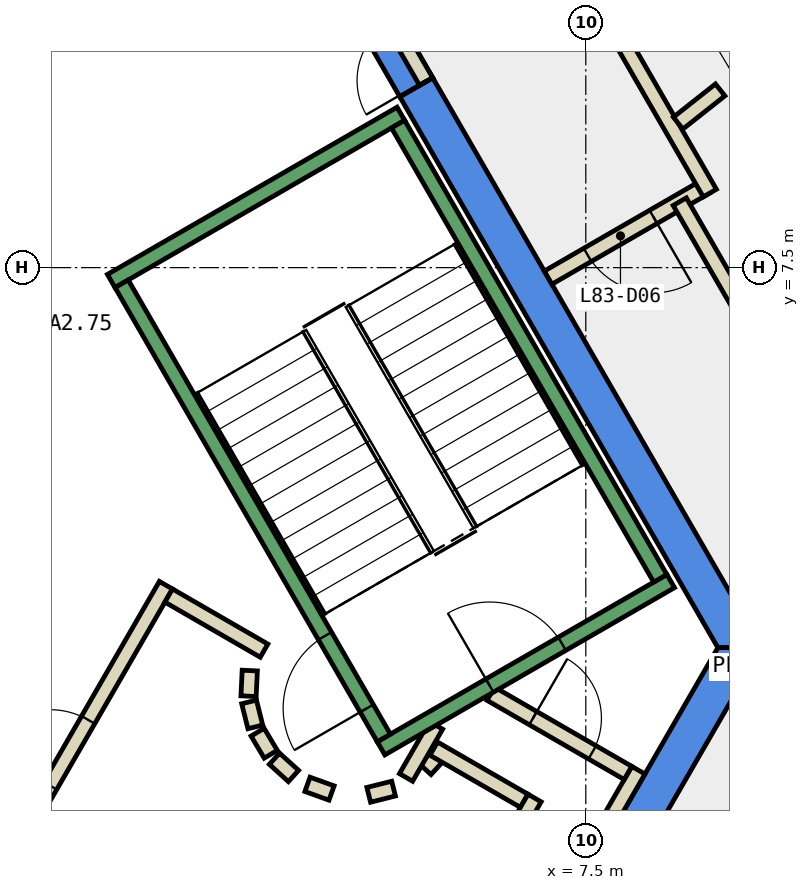
"""IFC4 building model, lengths in metres.
Left out: names, types, materials, properties, quantities, classifications, styles, units other than length and angle.
Written with IfcOpenShell. Run it as: python <this file> out.ifc"""

import sys

from ifc_helpers import new_model, si_unit, direction, frame, frame_2d, origin, place, context, subcontext, project, spatial, polyline, rectangle, outline, extrude, element, fill, save


model = new_model("IFC4")
c1 = context("Model", 3, precision=1e-05, world=origin(), true_north=direction((0.0, 1.0)))
c2 = subcontext(c1, "Body", "Model", "MODEL_VIEW")
j1 = project(units=[si_unit("LENGTHUNIT", "METRE"), si_unit("PLANEANGLEUNIT", "RADIAN")], contexts=[c1])
p1 = place(None, origin())
s1 = spatial("IfcSite", under=j1, at=p1, CompositionType="ELEMENT")
p2 = place(p1, origin())
s2 = spatial("IfcBuilding", under=s1, at=p2, CompositionType="ELEMENT")
p3 = place(p2, frame((0.0, 0.0, 353.9)))
s3 = spatial("IfcBuildingStorey", under=s2, at=p3, CompositionType="ELEMENT", Elevation=353.9)
p4 = place(p3, frame((0.0, 0.0, -0.35)))
e1 = element("IfcWall", 1, at=p4, inside=s3, PredefinedType="SHEAR", context=c2, shape_type="SweptSolid", body=[
    extrude(outline(polyline([(5.486, 9.998), (5.053, 9.748), (9.238, 2.5), (9.815, 2.5), (5.486, 9.998)])), origin(), (0.0, 0.0, 1.0), 4.4),
])
p5 = place(p3, frame((0.0, 0.0, 3.6)))
e2 = element("IfcWall", 2, at=p5, inside=s3, PredefinedType="SHEAR", context=c2, shape_type="SweptSolid", body=[
    extrude(outline(polyline([(5.022, 10.8), (4.677, 10.601), (4.619, 10.5), (5.053, 9.748), (5.486, 9.998), (5.022, 10.8)])), origin(), (0.0, 0.0, 1.0), 0.45),
])
p6 = place(p3, frame((0.0, 0.0, -0.35)))
e3 = element("IfcWall", 3, at=p6, inside=s3, PredefinedType="SHEAR", context=c2, shape_type="SweptSolid", body=[
    extrude(outline(polyline([(4.907, -6.0), (9.815, 2.5), (9.238, 2.5), (4.619, -5.5), (4.907, -6.0)])), origin(), (0.0, 0.0, 1.0), 4.4),
])
p7 = place(p3, frame((5.39, 0.898, 0.0), z_axis=(0.0, 0.0, 1.0), x_axis=(0.673828488714, 0.738887791073, 0.0)))
e4 = element("IfcWall", 4, at=p7, inside=s3, PredefinedType="PARTITIONING", context=c2, shape_type="SweptSolid", body=[
    extrude(rectangle(XDim=0.263, YDim=0.2, at=frame_2d((0.131, 0.0))), origin(), (0.0, 0.0, 1.0), 4.05),
])
p8 = place(p3, frame((5.499, 1.172, 0.0), z_axis=(0.0, 0.0, 1.0), x_axis=(0.866333505267, -0.499465972466, 0.0)))
e5 = element("IfcWall", 5, at=p8, inside=s3, PredefinedType="PARTITIONING", context=c2, shape_type="SweptSolid", body=[
    extrude(rectangle(XDim=1.374, YDim=0.2, at=frame_2d((0.687, 0.0))), origin(), (0.0, 0.0, 1.0), 4.05),
])
p9 = place(p3, frame((6.826, 0.522, 0.0), z_axis=(0.0, 0.0, 1.0), x_axis=(-0.500016722714, -0.866015748706, 0.0)))
e6 = element("IfcWall", 6, at=p9, inside=s3, PredefinedType="PARTITIONING", context=c2, shape_type="SweptSolid", body=[
    extrude(rectangle(XDim=1.7, YDim=0.2, at=frame_2d((0.85, 0.0))), origin(), (0.0, 0.0, 1.0), 4.05),
])
p10 = place(p3, frame((8.192, 0.888, 0.0), z_axis=(0.0, 0.0, 1.0), x_axis=(-0.499940625693, -0.866059680843, 0.0)))
e7 = element("IfcWall", 7, at=p10, inside=s3, PredefinedType="PARTITIONING", context=c2, shape_type="SweptSolid", body=[
    extrude(rectangle(XDim=2.68, YDim=0.2, at=frame_2d((1.34, 0.0))), origin(), (0.0, 0.0, 1.0), 4.05),
])
p11 = place(p3, frame((5.135, 0.793, 0.0), z_axis=(0.0, 0.0, 1.0), x_axis=(0.499526442893, 0.866298639529, 0.0)))
e8 = element("IfcWall", 8, at=p11, inside=s3, PredefinedType="PARTITIONING", context=c2, shape_type="SweptSolid", body=[
    extrude(rectangle(XDim=0.791, YDim=0.2, at=frame_2d((0.396, 0.0))), origin(), (0.0, 0.0, 1.0), 4.05),
])
p12 = place(p3, frame((6.25, 1.894, 0.0), z_axis=(0.0, 0.0, 1.0), x_axis=(0.866043184279, -0.499969202016, 0.0)))
e9 = element("IfcWall", 9, at=p12, inside=s3, PredefinedType="PARTITIONING", context=c2, shape_type="SweptSolid", body=[
    extrude(rectangle(XDim=2.084, YDim=0.2, at=frame_2d((1.042, 0.0))), origin(), (0.0, 0.0, 1.0), 4.05),
])
p13 = place(p12, frame((0.642, 0.0, 0.0)))
e10 = element("IfcOpeningElement", 10, at=p13, cuts=e9, PredefinedType="OPENING", context=c2, shape_type="SweptSolid", body=[
    extrude(rectangle(XDim=0.9, YDim=2.1, at=frame_2d((0.45, 1.05))), frame((0.0, 0.11, 0.0), z_axis=(0.0, -1.0, 0.0), x_axis=(1.0, 0.0, 0.0)), (0.0, 0.0, 1.0), 0.22),
])
p14 = place(p3, frame((3.079, 2.199, 0.0), z_axis=(0.0, 0.0, 1.0), x_axis=(-0.047771483479, -0.998858290933, 0.0)))
e11 = element("IfcWall", 11, at=p14, inside=s3, PredefinedType="PARTITIONING", context=c2, shape_type="SweptSolid", body=[
    extrude(rectangle(XDim=0.337, YDim=0.2, at=frame_2d((0.169, 0.0))), origin(), (0.0, 0.0, 1.0), 4.05),
])
p15 = place(p3, frame((3.07, 1.786, 0.0), z_axis=(0.0, 0.0, 1.0), x_axis=(0.242705583207, -0.970099994784, 0.0)))
e12 = element("IfcWall", 12, at=p15, inside=s3, PredefinedType="PARTITIONING", context=c2, shape_type="SweptSolid", body=[
    extrude(rectangle(XDim=0.338, YDim=0.2, at=frame_2d((0.169, 0.0))), origin(), (0.0, 0.0, 1.0), 4.05),
])
for number, where, z_axis, x_axis in (
    (13, (3.182, 1.388, 0.0), (0.0, 0.0, 1.0), (0.512, -0.859, 0.0)),
    (14, (3.404, 1.039, 0.0), (0.0, 0.0, 1.0), (0.74, -0.672, 0.0)),
):
    element("IfcWall", number, at=place(p3, frame(where, z_axis=z_axis, x_axis=x_axis)), inside=s3, PredefinedType="PARTITIONING", context=c2, shape_type="SweptSolid", body=[
        extrude(rectangle(XDim=0.338, YDim=0.2, at=frame_2d((0.169, 0.0))), origin(), (0.0, 0.0, 1.0), 4.05),
    ])
p16 = place(p3, frame((3.838, 0.702, 0.0), z_axis=(0.0, 0.0, 1.0), x_axis=(0.941035081519, -0.338308993895, 0.0)))
e15 = element("IfcWall", 15, at=p16, inside=s3, PredefinedType="PARTITIONING", context=c2, shape_type="SweptSolid", body=[
    extrude(rectangle(XDim=0.337, YDim=0.2, at=frame_2d((0.168, 0.0))), origin(), (0.0, 0.0, 1.0), 4.05),
])
p17 = place(p3, frame((4.644, 0.564, 0.0), z_axis=(0.0, 0.0, 1.0), x_axis=(0.969929076366, 0.243387729394, 0.0)))
e16 = element("IfcWall", 16, at=p17, inside=s3, PredefinedType="PARTITIONING", context=c2, shape_type="SweptSolid", body=[
    extrude(rectangle(XDim=0.337, YDim=0.2, at=frame_2d((0.168, 0.0))), origin(), (0.0, 0.0, 1.0), 4.05),
])
p18 = place(p3, frame((-0.52, -1.0, 0.0), z_axis=(0.0, 0.0, 1.0), x_axis=(0.50011622646, 0.865958290007, 0.0)))
e17 = element("IfcWall", 17, at=p18, inside=s3, PredefinedType="PARTITIONING", context=c2, shape_type="SweptSolid", body=[
    extrude(rectangle(XDim=4.991, YDim=0.2, at=frame_2d((2.496, 0.0))), origin(), (0.0, 0.0, 1.0), 4.05),
])
p19 = place(p18, frame((1.945, 0.0, 0.0)))
e18 = element("IfcOpeningElement", 18, at=p19, cuts=e17, PredefinedType="OPENING", context=c2, shape_type="SweptSolid", body=[
    extrude(rectangle(XDim=1.0, YDim=2.1, at=frame_2d((0.5, 1.05))), frame((0.0, 0.11, 0.0), z_axis=(0.0, -1.0, 0.0), x_axis=(1.0, 0.0, 0.0)), (0.0, 0.0, 1.0), 0.22),
])
p20 = place(p3, frame((2.012, 3.186, 0.0), z_axis=(0.0, 0.0, 1.0), x_axis=(0.865891012941, -0.500232699559, 0.0)))
e19 = element("IfcWall", 19, at=p20, inside=s3, PredefinedType="PARTITIONING", context=c2, shape_type="SweptSolid", body=[
    extrude(rectangle(XDim=1.449, YDim=0.2, at=frame_2d((0.725, 0.0))), origin(), (0.0, 0.0, 1.0), 4.05),
])
p21 = place(p3, frame((9.082, 8.568, 0.0), z_axis=(0.0, 0.0, 1.0), x_axis=(-0.865955154139, -0.50012165622, 0.0)))
e20 = element("IfcWall", 20, at=p21, inside=s3, PredefinedType="PARTITIONING", context=c2, shape_type="SweptSolid", body=[
    extrude(rectangle(XDim=2.4, YDim=0.2, at=frame_2d((1.2, 0.0))), origin(), (0.0, 0.0, 1.0), 4.05),
])
p22 = place(p21, frame((0.8, 0.0, 0.0)))
e21 = element("IfcOpeningElement", 21, at=p22, cuts=e20, PredefinedType="OPENING", context=c2, shape_type="SweptSolid", body=[
    extrude(rectangle(XDim=1.0, YDim=2.1, at=frame_2d((0.5, 1.05))), frame((0.0, 0.11, 0.0), z_axis=(0.0, -1.0, 0.0), x_axis=(1.0, 0.0, 0.0)), (0.0, 0.0, 1.0), 0.22),
])
p23 = place(p3, frame((7.388, 11.502, 0.0), z_axis=(0.0, 0.0, 1.0), x_axis=(0.499993059066, -0.866029411098, 0.0)))
e22 = element("IfcWall", 22, at=p23, inside=s3, PredefinedType="PARTITIONING", context=c2, shape_type="SweptSolid", body=[
    extrude(rectangle(XDim=3.488, YDim=0.2, at=frame_2d((1.744, 0.0))), origin(), (0.0, 0.0, 1.0), 1.95),
])
p24 = place(p3, frame((8.736, 8.368, 0.0), z_axis=(0.0, 0.0, 1.0), x_axis=(0.499945030264, -0.86605713825, 0.0)))
e23 = element("IfcWall", 23, at=p24, inside=s3, PredefinedType="PARTITIONING", context=c2, shape_type="SweptSolid", body=[
    extrude(rectangle(XDim=2.532, YDim=0.2, at=frame_2d((1.266, 0.0))), origin(), (0.0, 0.0, 1.0), 4.05),
])
p25 = place(p3, frame((9.268, 9.838, 0.0), z_axis=(0.0, 0.0, 1.0), x_axis=(-0.784572335163, -0.620037297988, 0.0)))
e24 = element("IfcWall", 24, at=p25, inside=s3, PredefinedType="PARTITIONING", context=c2, shape_type="SweptSolid", body=[
    extrude(rectangle(XDim=0.705, YDim=0.2, at=frame_2d((0.353, 0.0))), origin(), (0.0, 0.0, 1.0), 1.95),
])
p26 = place(p3, frame((5.399, 9.948, 0.0), z_axis=(0.0, 0.0, 1.0), x_axis=(-0.499882215713, 0.866093395895, 0.0)))
e25 = element("IfcWall", 25, at=p26, inside=s3, PredefinedType="PARTITIONING", context=c2, shape_type="SweptSolid", body=[
    extrude(rectangle(XDim=0.926, YDim=0.2, at=frame_2d((0.463, 0.0))), origin(), (0.0, 0.0, 1.0), 2.4),
])
p27 = place(p26, frame((0.017, 0.0, 0.0)))
e26 = element("IfcOpeningElement", 26, at=p27, cuts=e25, PredefinedType="OPENING", context=c2, shape_type="SweptSolid", body=[
    extrude(rectangle(XDim=0.9, YDim=2.1, at=frame_2d((0.45, 1.05))), frame((0.0, 0.11, 0.0), z_axis=(0.0, -1.0, 0.0), x_axis=(1.0, 0.0, 0.0)), (0.0, 0.0, 1.0), 0.22),
])
p28 = place(p3, frame((4.806, 1.176, 0.0), z_axis=(0.0, 0.0, 1.0), x_axis=(0.866059941101, 0.499940174841, 0.0)))
e27 = element("IfcWall", 27, at=p28, inside=s3, PredefinedType="STANDARD", context=c2, shape_type="SweptSolid", body=[
    extrude(rectangle(XDim=4.4, YDim=0.2, at=frame_2d((2.2, 0.0))), origin(), (0.0, 0.0, 1.0), 4.05),
])
p29 = place(p28, frame((1.65, 0.0, 0.0)))
e28 = element("IfcOpeningElement", 28, at=p29, cuts=e27, PredefinedType="OPENING", context=c2, shape_type="SweptSolid", body=[
    extrude(rectangle(XDim=1.1, YDim=2.2, at=frame_2d((0.55, 1.1))), frame((0.0, 0.11, 0.0), z_axis=(0.0, -1.0, 0.0), x_axis=(1.0, 0.0, 0.0)), (0.0, 0.0, 1.0), 0.22),
])
p30 = place(p3, frame((1.256, 7.324, 0.0), z_axis=(0.0, 0.0, 1.0), x_axis=(0.866046073146, 0.499964197906, 0.0)))
e29 = element("IfcWall", 29, at=p30, inside=s3, PredefinedType="STANDARD", context=c2, shape_type="SweptSolid", body=[
    extrude(rectangle(XDim=4.4, YDim=0.2, at=frame_2d((2.2, 0.0))), origin(), (0.0, 0.0, 1.0), 4.05),
])
p31 = place(p3, frame((4.843, 1.312, 0.0), z_axis=(0.0, 0.0, 1.0), x_axis=(-0.499963383562, 0.866046543262, 0.0)))
e30 = element("IfcWall", 30, at=p31, inside=s3, PredefinedType="STANDARD", context=c2, shape_type="SweptSolid", body=[
    extrude(rectangle(XDim=6.9, YDim=0.2, at=frame_2d((3.45, 0.0))), origin(), (0.0, 0.0, 1.0), 4.05),
])
p32 = place(p31, frame((0.45, 0.0, 0.0)))
e31 = element("IfcOpeningElement", 31, at=p32, cuts=e30, PredefinedType="OPENING", context=c2, shape_type="SweptSolid", body=[
    extrude(rectangle(XDim=1.1, YDim=2.2, at=frame_2d((0.55, 1.1))), frame((0.0, 0.11, 0.0), z_axis=(0.0, -1.0, 0.0), x_axis=(1.0, 0.0, 0.0)), (0.0, 0.0, 1.0), 0.22),
])
p33 = place(p3, frame((8.48, 3.412, 0.0), z_axis=(0.0, 0.0, 1.0), x_axis=(-0.499978703459, 0.866037698999, 0.0)))
e32 = element("IfcWall", 32, at=p33, inside=s3, PredefinedType="STANDARD", context=c2, shape_type="SweptSolid", body=[
    extrude(rectangle(XDim=6.9, YDim=0.2, at=frame_2d((3.45, 0.0))), origin(), (0.0, 0.0, 1.0), 4.05),
])
p34 = place(p22, origin())
e33 = element("IfcDoor", 33, at=p34, inside=s3, OperationType="SINGLE_SWING_LEFT", PredefinedType="DOOR", context=c2, shape_type="SweptSolid", body=[
    extrude(rectangle(XDim=1.0, YDim=2.1, at=frame_2d((0.5, 1.05))), frame((0.0, 0.025, 0.0), z_axis=(0.0, -1.0, 0.0), x_axis=(1.0, 0.0, 0.0)), (0.0, 0.0, 1.0), 0.05),
])
fill(e21, e33)
p35 = place(p19, origin())
e34 = element("IfcDoor", 34, at=p35, inside=s3, OperationType="SINGLE_SWING_LEFT", PredefinedType="DOOR", context=c2, shape_type="SweptSolid", body=[
    extrude(rectangle(XDim=1.0, YDim=2.1, at=frame_2d((0.5, 1.05))), frame((0.0, 0.025, 0.0), z_axis=(0.0, -1.0, 0.0), x_axis=(1.0, 0.0, 0.0)), (0.0, 0.0, 1.0), 0.05),
])
fill(e18, e34)
p36 = place(p13, origin())
e35 = element("IfcDoor", 35, at=p36, inside=s3, OperationType="SINGLE_SWING_LEFT", PredefinedType="DOOR", context=c2, shape_type="SweptSolid", body=[
    extrude(rectangle(XDim=0.9, YDim=2.1, at=frame_2d((0.45, 1.05))), frame((0.0, 0.025, 0.0), z_axis=(0.0, -1.0, 0.0), x_axis=(1.0, 0.0, 0.0)), (0.0, 0.0, 1.0), 0.05),
])
fill(e10, e35)
p37 = place(p27, origin())
e36 = element("IfcDoor", 36, at=p37, inside=s3, OperationType="SINGLE_SWING_LEFT", PredefinedType="DOOR", context=c2, shape_type="SweptSolid", body=[
    extrude(rectangle(XDim=0.9, YDim=2.1, at=frame_2d((0.45, 1.05))), frame((0.0, 0.025, 0.0), z_axis=(0.0, -1.0, 0.0), x_axis=(1.0, 0.0, 0.0)), (0.0, 0.0, 1.0), 0.05),
])
fill(e26, e36)
p38 = place(p32, origin())
e37 = element("IfcDoor", 37, at=p38, inside=s3, OperationType="SINGLE_SWING_LEFT", PredefinedType="DOOR", context=c2, shape_type="SweptSolid", body=[
    extrude(rectangle(XDim=1.1, YDim=2.2, at=frame_2d((0.55, 1.1))), frame((0.0, 0.025, 0.0), z_axis=(0.0, -1.0, 0.0), x_axis=(1.0, 0.0, 0.0)), (0.0, 0.0, 1.0), 0.05),
])
fill(e31, e37)
p39 = place(p29, origin())
e38 = element("IfcDoor", 38, at=p39, inside=s3, OperationType="SINGLE_SWING_LEFT", PredefinedType="DOOR", context=c2, shape_type="SweptSolid", body=[
    extrude(rectangle(XDim=1.1, YDim=2.2, at=frame_2d((0.55, 1.1))), frame((0.0, 0.025, 0.0), z_axis=(0.0, -1.0, 0.0), x_axis=(1.0, 0.0, 0.0)), (0.0, 0.0, 1.0), 0.05),
])
fill(e28, e38)
save(model, sys.argv[1])
